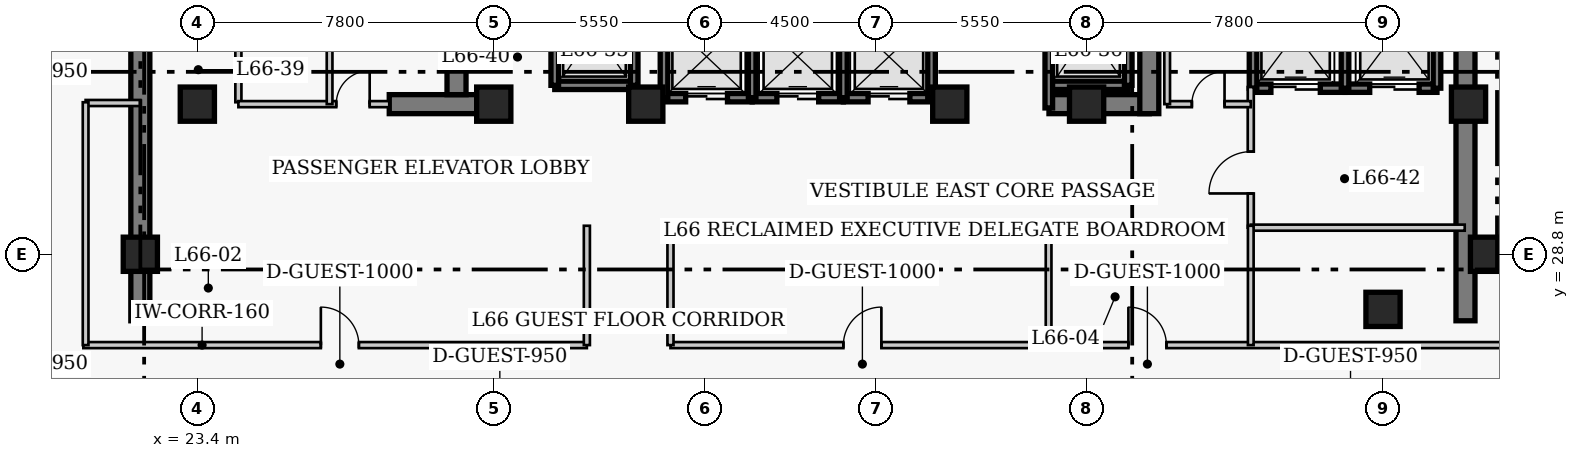
"""IFC4 building model, lengths in metres.
Left out: names, types, materials, properties, quantities, classifications, styles, units other than length and angle.
Written with IfcOpenShell. Run it as: python <this file> out.ifc"""

import sys

from ifc_helpers import new_model, si_unit, direction, frame, frame_2d, origin, origin_2d, place, context, subcontext, project, spatial, rectangle, extrude, element, fill, save


model = new_model("IFC4")
c1 = context("Model", 3, precision=1e-05, world=origin(), true_north=direction((0.0, 1.0)))
c2 = subcontext(c1, "Body", "Model", "MODEL_VIEW")
j1 = project(units=[si_unit("LENGTHUNIT", "METRE"), si_unit("PLANEANGLEUNIT", "RADIAN")], contexts=[c1])
p1 = place(None, origin())
s1 = spatial("IfcSite", under=j1, at=p1, CompositionType="ELEMENT")
p2 = place(p1, origin())
s2 = spatial("IfcBuilding", under=s1, at=p2, CompositionType="ELEMENT")
p3 = place(p2, frame((0.0, 0.0, 265.4)))
s3 = spatial("IfcBuildingStorey", under=s2, at=p3, CompositionType="ELEMENT", Elevation=265.4)
for number, where, z_axis, x_axis in (
    (1, (21.9, 27.05, 0.0), (0.0, 0.0, 1.0), (0.0, 1.0, 0.0)),
    (2, (56.77, 27.05, 0.0), (0.0, 0.0, 1.0), (0.0, 1.0, 0.0)),
):
    element("IfcWall", number, at=place(p3, frame(where, z_axis=z_axis, x_axis=x_axis)), inside=s3, PredefinedType="SHEAR", context=c2, shape_type="SweptSolid", body=[
        extrude(rectangle(XDim=13.52, YDim=0.5, at=frame_2d((6.76, 0.0))), origin(), (0.0, 0.0, 1.0), 4.0),
    ])
p4 = place(p3, frame((28.45, 32.75, 0.0), z_axis=(0.0, 0.0, 1.0), x_axis=(1.0, 0.0, 0.0)))
e3 = element("IfcWall", 3, at=p4, inside=s3, PredefinedType="SHEAR", context=c2, shape_type="SweptSolid", body=[
    extrude(rectangle(XDim=2.4, YDim=0.5, at=frame_2d((1.2, 0.0))), origin(), (0.0, 0.0, 1.0), 4.0),
])
p5 = place(p3, frame((45.81, 32.75, 0.0), z_axis=(0.0, 0.0, 1.0), x_axis=(1.0, 0.0, 0.0)))
e4 = element("IfcWall", 4, at=p5, inside=s3, PredefinedType="SHEAR", context=c2, shape_type="SweptSolid", body=[
    extrude(rectangle(XDim=2.64, YDim=0.5, at=frame_2d((1.32, 0.0))), origin(), (0.0, 0.0, 1.0), 4.0),
])
p6 = place(p3, frame((30.22, 33.0, 0.0), z_axis=(0.0, 0.0, 1.0), x_axis=(0.0, 1.0, 0.0)))
e5 = element("IfcWall", 5, at=p6, inside=s3, PredefinedType="SHEAR", context=c2, shape_type="SweptSolid", body=[
    extrude(rectangle(XDim=7.32, YDim=0.5, at=frame_2d((3.66, 0.0))), origin(), (0.0, 0.0, 1.0), 4.0),
])
p7 = place(p3, frame((48.45, 32.5, 0.0), z_axis=(0.0, 0.0, 1.0), x_axis=(0.0, 1.0, 0.0)))
e6 = element("IfcWall", 6, at=p7, inside=s3, PredefinedType="SHEAR", context=c2, shape_type="SweptSolid", body=[
    extrude(rectangle(XDim=7.82, YDim=0.5, at=frame_2d((3.91, 0.0))), origin(), (0.0, 0.0, 1.0), 4.0),
])
p8 = place(p7, frame((5.7, 0.0, 0.0)))
e7 = element("IfcOpeningElement", 7, at=p8, cuts=e6, PredefinedType="OPENING", context=c2, shape_type="SweptSolid", body=[
    extrude(rectangle(XDim=1.1, YDim=2.15, at=frame_2d((0.55, 1.075))), frame((0.0, 0.26, 0.0), z_axis=(0.0, -1.0, 0.0), x_axis=(1.0, 0.0, 0.0)), (0.0, 0.0, 1.0), 0.52),
])
for number, where, z_axis, x_axis in (
    (8, (21.9, 28.8, 0.0), (0.0, 0.0, 1.0), (1.0, 0.0, 0.0)),
    (9, (57.35, 28.8, 0.0), (0.0, 0.0, 1.0), (1.0, 0.0, 0.0)),
    (10, (23.4, 32.75, 0.0), (0.0, 0.0, 1.0), (1.0, 0.0, 0.0)),
    (11, (31.2, 32.75, 0.0), (0.0, 0.0, 1.0), (1.0, 0.0, 0.0)),
    (12, (35.2, 32.75, 0.0), (0.0, 0.0, 1.0), (1.0, 0.0, 0.0)),
    (13, (43.2, 32.75, 0.0), (0.0, 0.0, 1.0), (1.0, 0.0, 0.0)),
    (14, (46.8, 32.75, 0.0), (0.0, 0.0, 1.0), (1.0, 0.0, 0.0)),
    (15, (54.6, 27.35, 0.0), (0.0, 0.0, 1.0), (1.0, 0.0, 0.0)),
    (16, (56.85, 32.75, 0.0), (0.0, 0.0, 1.0), (1.0, 0.0, 0.0)),
):
    element("IfcColumn", number, at=place(p3, frame(where, z_axis=z_axis, x_axis=x_axis)), inside=s3, PredefinedType="COLUMN", context=c2, shape_type="SweptSolid", body=[
        extrude(rectangle(XDim=0.9, YDim=0.9, at=origin_2d()), origin(), (0.0, 0.0, 1.0), 4.0),
    ])
p9 = place(p3, frame((35.68, 32.92, 0.0), z_axis=(0.0, 0.0, 1.0), x_axis=(1.0, 0.0, 0.0)))
e17 = element("IfcWall", 17, at=p9, inside=s3, PredefinedType="SHEAR", context=c2, shape_type="SweptSolid", body=[
    extrude(rectangle(XDim=2.32, YDim=0.22, at=frame_2d((1.16, 0.0))), origin(), (0.0, 0.0, 1.0), 4.0),
])
p10 = place(p9, frame((0.57, 0.0, 0.0)))
e18 = element("IfcOpeningElement", 18, at=p10, cuts=e17, PredefinedType="OPENING", context=c2, shape_type="SweptSolid", body=[
    extrude(rectangle(XDim=1.1, YDim=2.15, at=frame_2d((0.55, 1.075))), frame((0.0, 0.12, 0.0), z_axis=(0.0, -1.0, 0.0), x_axis=(1.0, 0.0, 0.0)), (0.0, 0.0, 1.0), 0.24),
])
p11 = place(p3, frame((35.68, 32.92, 0.0), z_axis=(0.0, 0.0, 1.0), x_axis=(0.0, 1.0, 0.0)))
e19 = element("IfcWall", 19, at=p11, inside=s3, PredefinedType="SHEAR", context=c2, shape_type="SweptSolid", body=[
    extrude(rectangle(XDim=2.16, YDim=0.2, at=frame_2d((1.08, 0.0))), origin(), (0.0, 0.0, 1.0), 4.0),
])
p12 = place(p3, frame((38.0, 32.92, 0.0), z_axis=(0.0, 0.0, 1.0), x_axis=(1.0, 0.0, 0.0)))
e20 = element("IfcWall", 20, at=p12, inside=s3, PredefinedType="SHEAR", context=c2, shape_type="SweptSolid", body=[
    extrude(rectangle(XDim=2.4, YDim=0.22, at=frame_2d((1.2, 0.0))), origin(), (0.0, 0.0, 1.0), 4.0),
])
p13 = place(p12, frame((0.65, 0.0, 0.0)))
e21 = element("IfcOpeningElement", 21, at=p13, cuts=e20, PredefinedType="OPENING", context=c2, shape_type="SweptSolid", body=[
    extrude(rectangle(XDim=1.1, YDim=2.15, at=frame_2d((0.55, 1.075))), frame((0.0, 0.12, 0.0), z_axis=(0.0, -1.0, 0.0), x_axis=(1.0, 0.0, 0.0)), (0.0, 0.0, 1.0), 0.24),
])
p14 = place(p3, frame((38.0, 32.92, 0.0), z_axis=(0.0, 0.0, 1.0), x_axis=(0.0, 1.0, 0.0)))
e22 = element("IfcWall", 22, at=p14, inside=s3, PredefinedType="SHEAR", context=c2, shape_type="SweptSolid", body=[
    extrude(rectangle(XDim=2.16, YDim=0.2, at=frame_2d((1.08, 0.0))), origin(), (0.0, 0.0, 1.0), 4.0),
])
p15 = place(p3, frame((40.4, 32.92, 0.0), z_axis=(0.0, 0.0, 1.0), x_axis=(1.0, 0.0, 0.0)))
e23 = element("IfcWall", 23, at=p15, inside=s3, PredefinedType="SHEAR", context=c2, shape_type="SweptSolid", body=[
    extrude(rectangle(XDim=2.32, YDim=0.22, at=frame_2d((1.16, 0.0))), origin(), (0.0, 0.0, 1.0), 4.0),
])
p16 = place(p15, frame((0.65, 0.0, 0.0)))
e24 = element("IfcOpeningElement", 24, at=p16, cuts=e23, PredefinedType="OPENING", context=c2, shape_type="SweptSolid", body=[
    extrude(rectangle(XDim=1.1, YDim=2.15, at=frame_2d((0.55, 1.075))), frame((0.0, 0.12, 0.0), z_axis=(0.0, -1.0, 0.0), x_axis=(1.0, 0.0, 0.0)), (0.0, 0.0, 1.0), 0.24),
])
for number, where, z_axis, x_axis in (
    (25, (40.4, 32.92, 0.0), (0.0, 0.0, 1.0), (0.0, 1.0, 0.0)),
    (26, (42.72, 32.92, 0.0), (0.0, 0.0, 1.0), (0.0, 1.0, 0.0)),
):
    element("IfcWall", number, at=place(p3, frame(where, z_axis=z_axis, x_axis=x_axis)), inside=s3, PredefinedType="SHEAR", context=c2, shape_type="SweptSolid", body=[
        extrude(rectangle(XDim=2.16, YDim=0.2, at=frame_2d((1.08, 0.0))), origin(), (0.0, 0.0, 1.0), 4.0),
    ])
p17 = place(p3, frame((51.18, 33.17, 0.0), z_axis=(0.0, 0.0, 1.0), x_axis=(1.0, 0.0, 0.0)))
e27 = element("IfcWall", 27, at=p17, inside=s3, PredefinedType="SHEAR", context=c2, shape_type="SweptSolid", body=[
    extrude(rectangle(XDim=2.42, YDim=0.22, at=frame_2d((1.21, 0.0))), origin(), (0.0, 0.0, 1.0), 4.0),
])
p18 = place(p17, frame((0.47, 0.0, 0.0)))
e28 = element("IfcOpeningElement", 28, at=p18, cuts=e27, PredefinedType="OPENING", context=c2, shape_type="SweptSolid", body=[
    extrude(rectangle(XDim=1.3, YDim=2.15, at=frame_2d((0.65, 1.075))), frame((0.0, 0.12, 0.0), z_axis=(0.0, -1.0, 0.0), x_axis=(1.0, 0.0, 0.0)), (0.0, 0.0, 1.0), 0.24),
])
p19 = place(p3, frame((51.18, 33.17, 0.0), z_axis=(0.0, 0.0, 1.0), x_axis=(0.0, 1.0, 0.0)))
e29 = element("IfcWall", 29, at=p19, inside=s3, PredefinedType="SHEAR", context=c2, shape_type="SweptSolid", body=[
    extrude(rectangle(XDim=2.86, YDim=0.2, at=frame_2d((1.43, 0.0))), origin(), (0.0, 0.0, 1.0), 4.0),
])
p20 = place(p3, frame((53.6, 33.17, 0.0), z_axis=(0.0, 0.0, 1.0), x_axis=(1.0, 0.0, 0.0)))
e30 = element("IfcWall", 30, at=p20, inside=s3, PredefinedType="SHEAR", context=c2, shape_type="SweptSolid", body=[
    extrude(rectangle(XDim=2.42, YDim=0.22, at=frame_2d((1.21, 0.0))), origin(), (0.0, 0.0, 1.0), 4.0),
])
p21 = place(p20, frame((0.65, 0.0, 0.0)))
e31 = element("IfcOpeningElement", 31, at=p21, cuts=e30, PredefinedType="OPENING", context=c2, shape_type="SweptSolid", body=[
    extrude(rectangle(XDim=1.3, YDim=2.15, at=frame_2d((0.65, 1.075))), frame((0.0, 0.12, 0.0), z_axis=(0.0, -1.0, 0.0), x_axis=(1.0, 0.0, 0.0)), (0.0, 0.0, 1.0), 0.24),
])
for number, where, z_axis, x_axis in (
    (32, (53.6, 33.17, 0.0), (0.0, 0.0, 1.0), (0.0, 1.0, 0.0)),
    (33, (56.02, 33.17, 0.0), (0.0, 0.0, 1.0), (0.0, 1.0, 0.0)),
):
    element("IfcWall", number, at=place(p3, frame(where, z_axis=z_axis, x_axis=x_axis)), inside=s3, PredefinedType="SHEAR", context=c2, shape_type="SweptSolid", body=[
        extrude(rectangle(XDim=2.86, YDim=0.2, at=frame_2d((1.43, 0.0))), origin(), (0.0, 0.0, 1.0), 4.0),
    ])
p22 = place(p3, frame((32.805, 33.245, 0.0), z_axis=(0.0, 0.0, 1.0), x_axis=(1.0, 0.0, 0.0)))
e34 = element("IfcWall", 34, at=p22, inside=s3, PredefinedType="SHEAR", context=c2, shape_type="SweptSolid", body=[
    extrude(rectangle(XDim=2.09, YDim=0.22, at=frame_2d((1.045, 0.0))), origin(), (0.0, 0.0, 1.0), 4.0),
])
for number, where, z_axis, x_axis in (
    (35, (32.805, 33.245, 0.0), (0.0, 0.0, 1.0), (0.0, 1.0, 0.0)),
    (36, (34.895, 33.245, 0.0), (0.0, 0.0, 1.0), (0.0, 1.0, 0.0)),
):
    element("IfcWall", number, at=place(p3, frame(where, z_axis=z_axis, x_axis=x_axis)), inside=s3, PredefinedType="SHEAR", context=c2, shape_type="SweptSolid", body=[
        extrude(rectangle(XDim=2.91, YDim=0.2, at=frame_2d((1.455, 0.0))), origin(), (0.0, 0.0, 1.0), 4.0),
    ])
p23 = place(p3, frame((45.805, 33.245, 0.0), z_axis=(0.0, 0.0, 1.0), x_axis=(1.0, 0.0, 0.0)))
e37 = element("IfcWall", 37, at=p23, inside=s3, PredefinedType="SHEAR", context=c2, shape_type="SweptSolid", body=[
    extrude(rectangle(XDim=2.09, YDim=0.22, at=frame_2d((1.045, 0.0))), origin(), (0.0, 0.0, 1.0), 4.0),
])
p24 = place(p3, frame((45.805, 32.65, 0.0), z_axis=(0.0, 0.0, 1.0), x_axis=(0.0, 1.0, 0.0)))
e38 = element("IfcWall", 38, at=p24, inside=s3, PredefinedType="SHEAR", context=c2, shape_type="SweptSolid", body=[
    extrude(rectangle(XDim=3.505, YDim=0.2, at=frame_2d((1.752, 0.0))), origin(), (0.0, 0.0, 1.0), 4.0),
])
p25 = place(p3, frame((47.895, 33.245, 0.0), z_axis=(0.0, 0.0, 1.0), x_axis=(0.0, 1.0, 0.0)))
e39 = element("IfcWall", 39, at=p25, inside=s3, PredefinedType="SHEAR", context=c2, shape_type="SweptSolid", body=[
    extrude(rectangle(XDim=2.91, YDim=0.2, at=frame_2d((1.455, 0.0))), origin(), (0.0, 0.0, 1.0), 4.0),
])
p26 = place(p3, frame((24.48, 32.8, 0.0), z_axis=(0.0, 0.0, 1.0), x_axis=(0.0, 1.0, 0.0)))
e40 = element("IfcWall", 40, at=p26, inside=s3, PredefinedType="PARTITIONING", context=c2, shape_type="SweptSolid", body=[
    extrude(rectangle(XDim=3.57, YDim=0.16, at=frame_2d((1.785, 0.0))), origin(), (0.0, 0.0, 1.0), 3.76),
])
p27 = place(p26, frame((1.604, 0.0, 0.0)))
e41 = element("IfcOpeningElement", 41, at=p27, cuts=e40, PredefinedType="OPENING", context=c2, shape_type="SweptSolid", body=[
    extrude(rectangle(XDim=0.9, YDim=2.1, at=frame_2d((0.45, 1.05))), frame((0.0, 0.09, 0.0), z_axis=(0.0, -1.0, 0.0), x_axis=(1.0, 0.0, 0.0)), (0.0, 0.0, 1.0), 0.18),
])
p28 = place(p3, frame((51.12, 29.5, 0.0), z_axis=(0.0, 0.0, 1.0), x_axis=(0.0, 1.0, 0.0)))
e42 = element("IfcWall", 42, at=p28, inside=s3, PredefinedType="PARTITIONING", context=c2, shape_type="SweptSolid", body=[
    extrude(rectangle(XDim=3.7, YDim=0.16, at=frame_2d((1.85, 0.0))), origin(), (0.0, 0.0, 1.0), 3.76),
])
p29 = place(p28, frame((0.9, 0.0, 0.0)))
e43 = element("IfcOpeningElement", 43, at=p29, cuts=e42, PredefinedType="OPENING", context=c2, shape_type="SweptSolid", body=[
    extrude(rectangle(XDim=1.1, YDim=2.15, at=frame_2d((0.55, 1.075))), frame((0.0, 0.09, 0.0), z_axis=(0.0, -1.0, 0.0), x_axis=(1.0, 0.0, 0.0)), (0.0, 0.0, 1.0), 0.18),
])
p30 = place(p3, frame((51.12, 29.5, 0.0), z_axis=(0.0, 0.0, 1.0), x_axis=(1.0, 0.0, 0.0)))
e44 = element("IfcWall", 44, at=p30, inside=s3, PredefinedType="PARTITIONING", context=c2, shape_type="SweptSolid", body=[
    extrude(rectangle(XDim=5.63, YDim=0.16, at=frame_2d((2.815, 0.0))), origin(), (0.0, 0.0, 1.0), 3.76),
])
p31 = place(p3, frame((24.48, 32.75, 0.0), z_axis=(0.0, 0.0, 1.0), x_axis=(1.0, 0.0, 0.0)))
e45 = element("IfcWall", 45, at=p31, inside=s3, PredefinedType="PARTITIONING", context=c2, shape_type="SweptSolid", body=[
    extrude(rectangle(XDim=3.97, YDim=0.16, at=frame_2d((1.985, 0.0))), origin(), (0.0, 0.0, 1.0), 3.76),
])
p32 = place(p31, frame((2.575, 0.0, 0.0)))
e46 = element("IfcOpeningElement", 46, at=p32, cuts=e45, PredefinedType="OPENING", context=c2, shape_type="SweptSolid", body=[
    extrude(rectangle(XDim=0.88, YDim=2.05, at=frame_2d((0.44, 1.025))), frame((0.0, 0.09, 0.0), z_axis=(0.0, -1.0, 0.0), x_axis=(1.0, 0.0, 0.0)), (0.0, 0.0, 1.0), 0.18),
])
p33 = place(p3, frame((48.92, 32.75, 0.0), z_axis=(0.0, 0.0, 1.0), x_axis=(1.0, 0.0, 0.0)))
e47 = element("IfcWall", 47, at=p33, inside=s3, PredefinedType="PARTITIONING", context=c2, shape_type="SweptSolid", body=[
    extrude(rectangle(XDim=2.2, YDim=0.16, at=frame_2d((1.1, 0.0))), origin(), (0.0, 0.0, 1.0), 3.76),
])
p34 = place(p33, frame((0.65, 0.0, 0.0)))
e48 = element("IfcOpeningElement", 48, at=p34, cuts=e47, PredefinedType="OPENING", context=c2, shape_type="SweptSolid", body=[
    extrude(rectangle(XDim=0.86, YDim=2.05, at=frame_2d((0.43, 1.025))), frame((0.0, 0.09, 0.0), z_axis=(0.0, -1.0, 0.0), x_axis=(1.0, 0.0, 0.0)), (0.0, 0.0, 1.0), 0.18),
])
for number, where, z_axis, x_axis in (
    (49, (48.92, 32.75, 0.0), (0.0, 0.0, 1.0), (0.0, 1.0, 0.0)),
    (50, (26.88, 32.75, 0.0), (0.0, 0.0, 1.0), (0.0, 1.0, 0.0)),
):
    element("IfcWall", number, at=place(p3, frame(where, z_axis=z_axis, x_axis=x_axis)), inside=s3, PredefinedType="PARTITIONING", context=c2, shape_type="SweptSolid", body=[
        extrude(rectangle(XDim=3.62, YDim=0.15, at=frame_2d((1.81, 0.0))), origin(), (0.0, 0.0, 1.0), 3.76),
    ])
p35 = place(p3, frame((20.4, 26.41, 0.0), z_axis=(0.0, 0.0, 1.0), x_axis=(1.0, 0.0, 0.0)))
e51 = element("IfcWall", 51, at=p35, inside=s3, PredefinedType="PARTITIONING", context=c2, shape_type="SweptSolid", body=[
    extrude(rectangle(XDim=13.25, YDim=0.16, at=frame_2d((6.625, 0.0))), origin(), (0.0, 0.0, 1.0), 3.76),
])
p36 = place(p35, frame((6.25, 0.0, 0.0)))
e52 = element("IfcOpeningElement", 52, at=p36, cuts=e51, PredefinedType="OPENING", context=c2, shape_type="SweptSolid", body=[
    extrude(rectangle(XDim=1.0, YDim=2.15, at=frame_2d((0.5, 1.075))), frame((0.0, 0.09, 0.0), z_axis=(0.0, -1.0, 0.0), x_axis=(1.0, 0.0, 0.0)), (0.0, 0.0, 1.0), 0.18),
])
p37 = place(p3, frame((35.85, 26.41, 0.0), z_axis=(0.0, 0.0, 1.0), x_axis=(1.0, 0.0, 0.0)))
e53 = element("IfcWall", 53, at=p37, inside=s3, PredefinedType="PARTITIONING", context=c2, shape_type="SweptSolid", body=[
    extrude(rectangle(XDim=22.6, YDim=0.16, at=frame_2d((11.3, 0.0))), origin(), (0.0, 0.0, 1.0), 3.76),
])
p38 = place(p37, frame((4.55, 0.0, 0.0)))
e54 = element("IfcOpeningElement", 54, at=p38, cuts=e53, PredefinedType="OPENING", context=c2, shape_type="SweptSolid", body=[
    extrude(rectangle(XDim=1.0, YDim=2.15, at=frame_2d((0.5, 1.075))), frame((0.0, 0.09, 0.0), z_axis=(0.0, -1.0, 0.0), x_axis=(1.0, 0.0, 0.0)), (0.0, 0.0, 1.0), 0.18),
])
p39 = place(p37, frame((12.05, 0.0, 0.0)))
e55 = element("IfcOpeningElement", 55, at=p39, cuts=e53, PredefinedType="OPENING", context=c2, shape_type="SweptSolid", body=[
    extrude(rectangle(XDim=1.0, YDim=2.15, at=frame_2d((0.5, 1.075))), frame((0.0, 0.09, 0.0), z_axis=(0.0, -1.0, 0.0), x_axis=(1.0, 0.0, 0.0)), (0.0, 0.0, 1.0), 0.18),
])
for number, where, z_axis, x_axis in (
    (56, (33.65, 26.41, 0.0), (0.0, 0.0, 1.0), (0.0, 1.0, 0.0)),
    (57, (35.85, 26.41, 0.0), (0.0, 0.0, 1.0), (0.0, 1.0, 0.0)),
):
    element("IfcWall", number, at=place(p3, frame(where, z_axis=z_axis, x_axis=x_axis)), inside=s3, PredefinedType="PARTITIONING", context=c2, shape_type="SweptSolid", body=[
        extrude(rectangle(XDim=3.14, YDim=0.16, at=frame_2d((1.57, 0.0))), origin(), (0.0, 0.0, 1.0), 3.76),
    ])
p40 = place(p3, frame((20.46, 32.78, 0.0), z_axis=(0.0, 0.0, 1.0), x_axis=(1.0, 0.0, 0.0)))
e58 = element("IfcWall", 58, at=p40, inside=s3, PredefinedType="PARTITIONING", context=c2, shape_type="SweptSolid", body=[
    extrude(rectangle(XDim=1.44, YDim=0.16, at=frame_2d((0.72, 0.0))), origin(), (0.0, 0.0, 1.0), 3.76),
])
p41 = place(p3, frame((20.46, 26.41, 0.0), z_axis=(0.0, 0.0, 1.0), x_axis=(0.0, 1.0, 0.0)))
e59 = element("IfcWall", 59, at=p41, inside=s3, PredefinedType="PARTITIONING", context=c2, shape_type="SweptSolid", body=[
    extrude(rectangle(XDim=6.39, YDim=0.15, at=frame_2d((3.195, 0.0))), origin(), (0.0, 0.0, 1.0), 3.76),
])
for number, where, z_axis, x_axis in (
    (60, (45.8, 26.41, 0.0), (0.0, 0.0, 1.0), (0.0, 1.0, 0.0)),
    (61, (51.12, 26.41, 0.0), (0.0, 0.0, 1.0), (0.0, 1.0, 0.0)),
):
    element("IfcWall", number, at=place(p3, frame(where, z_axis=z_axis, x_axis=x_axis)), inside=s3, PredefinedType="PARTITIONING", context=c2, shape_type="SweptSolid", body=[
        extrude(rectangle(XDim=3.14, YDim=0.15, at=frame_2d((1.57, 0.0))), origin(), (0.0, 0.0, 1.0), 3.76),
    ])
p42 = place(p10, origin())
e62 = element("IfcDoor", 62, at=p42, inside=s3, OperationType="DOUBLE_DOOR_SLIDING", PredefinedType="DOOR", context=c2, shape_type="SweptSolid", body=[
    extrude(rectangle(XDim=1.1, YDim=2.15, at=frame_2d((0.55, 1.075))), frame((0.0, 0.025, 0.0), z_axis=(0.0, -1.0, 0.0), x_axis=(1.0, 0.0, 0.0)), (0.0, 0.0, 1.0), 0.05),
])
fill(e18, e62)
p43 = place(p13, origin())
e63 = element("IfcDoor", 63, at=p43, inside=s3, OperationType="DOUBLE_DOOR_SLIDING", PredefinedType="DOOR", context=c2, shape_type="SweptSolid", body=[
    extrude(rectangle(XDim=1.1, YDim=2.15, at=frame_2d((0.55, 1.075))), frame((0.0, 0.025, 0.0), z_axis=(0.0, -1.0, 0.0), x_axis=(1.0, 0.0, 0.0)), (0.0, 0.0, 1.0), 0.05),
])
fill(e21, e63)
p44 = place(p16, origin())
e64 = element("IfcDoor", 64, at=p44, inside=s3, OperationType="DOUBLE_DOOR_SLIDING", PredefinedType="DOOR", context=c2, shape_type="SweptSolid", body=[
    extrude(rectangle(XDim=1.1, YDim=2.15, at=frame_2d((0.55, 1.075))), frame((0.0, 0.025, 0.0), z_axis=(0.0, -1.0, 0.0), x_axis=(1.0, 0.0, 0.0)), (0.0, 0.0, 1.0), 0.05),
])
fill(e24, e64)
p45 = place(p18, origin())
e65 = element("IfcDoor", 65, at=p45, inside=s3, OperationType="DOUBLE_DOOR_SLIDING", PredefinedType="DOOR", context=c2, shape_type="SweptSolid", body=[
    extrude(rectangle(XDim=1.3, YDim=2.15, at=frame_2d((0.65, 1.075))), frame((0.0, 0.025, 0.0), z_axis=(0.0, -1.0, 0.0), x_axis=(1.0, 0.0, 0.0)), (0.0, 0.0, 1.0), 0.05),
])
fill(e28, e65)
p46 = place(p21, origin())
e66 = element("IfcDoor", 66, at=p46, inside=s3, OperationType="DOUBLE_DOOR_SLIDING", PredefinedType="DOOR", context=c2, shape_type="SweptSolid", body=[
    extrude(rectangle(XDim=1.3, YDim=2.15, at=frame_2d((0.65, 1.075))), frame((0.0, 0.025, 0.0), z_axis=(0.0, -1.0, 0.0), x_axis=(1.0, 0.0, 0.0)), (0.0, 0.0, 1.0), 0.05),
])
fill(e31, e66)
p47 = place(p29, origin())
e67 = element("IfcDoor", 67, at=p47, inside=s3, OperationType="SINGLE_SWING_LEFT", PredefinedType="DOOR", context=c2, shape_type="SweptSolid", body=[
    extrude(rectangle(XDim=1.1, YDim=2.15, at=frame_2d((0.55, 1.075))), frame((0.0, 0.025, 0.0), z_axis=(0.0, -1.0, 0.0), x_axis=(1.0, 0.0, 0.0)), (0.0, 0.0, 1.0), 0.05),
])
fill(e43, e67)
p48 = place(p32, origin())
e68 = element("IfcDoor", 68, at=p48, inside=s3, OperationType="SINGLE_SWING_RIGHT", PredefinedType="DOOR", context=c2, shape_type="SweptSolid", body=[
    extrude(rectangle(XDim=0.88, YDim=2.05, at=frame_2d((0.44, 1.025))), frame((0.0, 0.025, 0.0), z_axis=(0.0, -1.0, 0.0), x_axis=(1.0, 0.0, 0.0)), (0.0, 0.0, 1.0), 0.05),
])
fill(e46, e68)
p49 = place(p34, origin())
e69 = element("IfcDoor", 69, at=p49, inside=s3, OperationType="SINGLE_SWING_RIGHT", PredefinedType="DOOR", context=c2, shape_type="SweptSolid", body=[
    extrude(rectangle(XDim=0.86, YDim=2.05, at=frame_2d((0.43, 1.025))), frame((0.0, 0.025, 0.0), z_axis=(0.0, -1.0, 0.0), x_axis=(1.0, 0.0, 0.0)), (0.0, 0.0, 1.0), 0.05),
])
fill(e48, e69)
p50 = place(p36, origin())
e70 = element("IfcDoor", 70, at=p50, inside=s3, OperationType="SINGLE_SWING_LEFT", PredefinedType="DOOR", context=c2, shape_type="SweptSolid", body=[
    extrude(rectangle(XDim=1.0, YDim=2.15, at=frame_2d((0.5, 1.075))), frame((0.0, 0.025, 0.0), z_axis=(0.0, -1.0, 0.0), x_axis=(1.0, 0.0, 0.0)), (0.0, 0.0, 1.0), 0.05),
])
fill(e52, e70)
p51 = place(p38, origin())
e71 = element("IfcDoor", 71, at=p51, inside=s3, OperationType="SINGLE_SWING_RIGHT", PredefinedType="DOOR", context=c2, shape_type="SweptSolid", body=[
    extrude(rectangle(XDim=1.0, YDim=2.15, at=frame_2d((0.5, 1.075))), frame((0.0, 0.025, 0.0), z_axis=(0.0, -1.0, 0.0), x_axis=(1.0, 0.0, 0.0)), (0.0, 0.0, 1.0), 0.05),
])
fill(e54, e71)
p52 = place(p39, origin())
e72 = element("IfcDoor", 72, at=p52, inside=s3, OperationType="SINGLE_SWING_LEFT", PredefinedType="DOOR", context=c2, shape_type="SweptSolid", body=[
    extrude(rectangle(XDim=1.0, YDim=2.15, at=frame_2d((0.5, 1.075))), frame((0.0, 0.025, 0.0), z_axis=(0.0, -1.0, 0.0), x_axis=(1.0, 0.0, 0.0)), (0.0, 0.0, 1.0), 0.05),
])
fill(e55, e72)
save(model, sys.argv[1])
